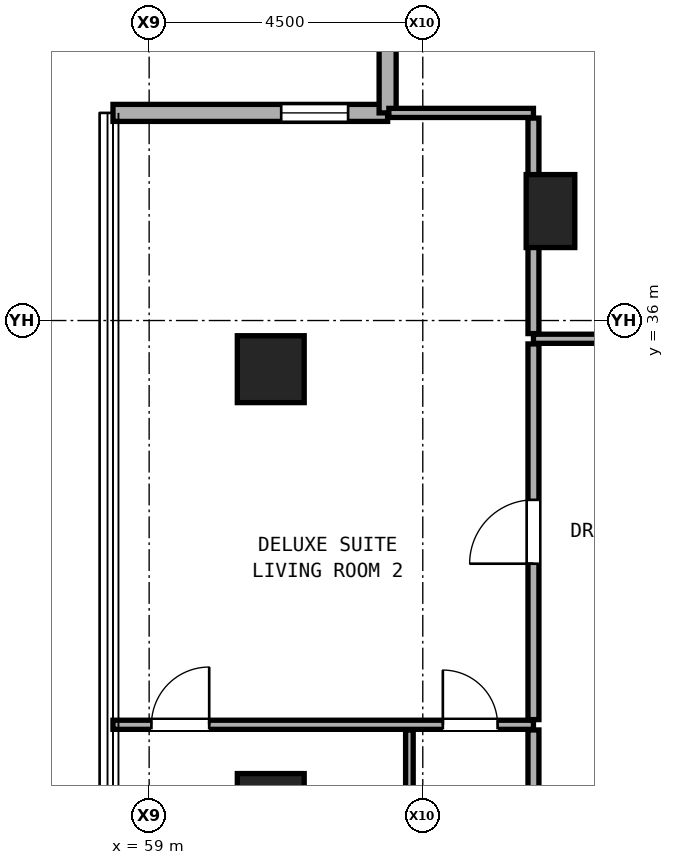
"""IFC4 building model, lengths in metres.
Left out: names, types, materials, properties, quantities, classifications, styles, units other than length and angle.
Written with IfcOpenShell. Run it as: python <this file> out.ifc"""

import sys

from ifc_helpers import new_model, si_unit, direction, frame, frame_2d, origin, origin_2d, place, context, subcontext, project, spatial, rectangle, hollow_rectangle, extrude, element, fill, save


model = new_model("IFC4")
c1 = context("Model", 3, precision=1e-05, world=origin(), true_north=direction((0.0, 1.0)))
c2 = subcontext(c1, "Body", "Model", "MODEL_VIEW")
j1 = project(units=[si_unit("LENGTHUNIT", "METRE"), si_unit("PLANEANGLEUNIT", "RADIAN")], contexts=[c1])
p1 = place(None, origin())
s1 = spatial("IfcSite", under=j1, at=p1, CompositionType="ELEMENT")
p2 = place(p1, origin())
s2 = spatial("IfcBuilding", under=s1, at=p2, CompositionType="ELEMENT")
p3 = place(p2, frame((0.0, 0.0, 101.6)))
s3 = spatial("IfcBuildingStorey", under=s2, at=p3, CompositionType="ELEMENT", Elevation=101.6)
for number, where, z_axis, x_axis in (
    (1, (61.0, 28.0, 0.0), (0.0, 0.0, 1.0), (1.0, 0.0, 0.0)),
    (2, (61.0, 35.2, 0.0), (0.0, 0.0, 1.0), (1.0, 0.0, 0.0)),
):
    element("IfcColumn", number, at=place(p3, frame(where, z_axis=z_axis, x_axis=x_axis)), inside=s3, PredefinedType="COLUMN", context=c2, shape_type="SweptSolid", body=[
        extrude(hollow_rectangle(XDim=1.1, YDim=1.1, WallThickness=0.06, at=origin_2d()), origin(), (0.0, 0.0, 1.0), 3.3),
    ])
p4 = place(p3, frame((65.6, 37.8, 0.0), z_axis=(0.0, 0.0, 1.0), x_axis=(1.0, 0.0, 0.0)))
e3 = element("IfcColumn", 3, at=p4, inside=s3, PredefinedType="PILASTER", context=c2, shape_type="SweptSolid", body=[
    extrude(rectangle(XDim=0.8, YDim=1.2, at=origin_2d()), origin(), (0.0, 0.0, 1.0), 3.3),
])
p5 = place(p3, frame((62.922, 39.414, 0.0), z_axis=(0.0, 0.0, 1.0), x_axis=(-1.0, 0.0, 0.0)))
e4 = element("IfcWall", 4, at=p5, inside=s3, PredefinedType="SOLIDWALL", context=c2, shape_type="SweptSolid", body=[
    extrude(rectangle(XDim=4.516, YDim=0.28, at=frame_2d((2.258, 0.0))), origin(), (0.0, 0.0, 1.0), 3.06),
])
p6 = place(p5, frame((0.65, 0.0, 0.85)))
e5 = element("IfcOpeningElement", 5, at=p6, cuts=e4, PredefinedType="OPENING", context=c2, shape_type="SweptSolid", body=[
    extrude(rectangle(XDim=1.1, YDim=2.0, at=frame_2d((0.55, 1.0))), frame((0.0, 0.15, 0.0), z_axis=(0.0, -1.0, 0.0), x_axis=(1.0, 0.0, 0.0)), (0.0, 0.0, 1.0), 0.3),
])
p7 = place(p3, frame((62.922, 43.931, 0.0), z_axis=(0.0, 0.0, 1.0), x_axis=(0.0, -1.0, 0.0)))
e6 = element("IfcWall", 6, at=p7, inside=s3, PredefinedType="SOLIDWALL", context=c2, shape_type="SweptSolid", body=[
    extrude(rectangle(XDim=4.516, YDim=0.28, at=frame_2d((2.258, 0.0))), origin(), (0.0, 0.0, 1.0), 3.06),
])
p8 = place(p3, frame((58.405, 29.352, 0.0), z_axis=(0.0, 0.0, 1.0), x_axis=(1.0, 0.0, 0.0)))
e7 = element("IfcWall", 7, at=p8, inside=s3, PredefinedType="PARTITIONING", context=c2, shape_type="SweptSolid", body=[
    extrude(rectangle(XDim=6.915, YDim=0.15, at=frame_2d((3.458, 0.0))), origin(), (0.0, 0.0, 1.0), 2.216),
])
p9 = place(p8, frame((0.633, 0.0, 0.0)))
e8 = element("IfcOpeningElement", 8, at=p9, cuts=e7, PredefinedType="OPENING", context=c2, shape_type="SweptSolid", body=[
    extrude(rectangle(XDim=0.95, YDim=2.15, at=frame_2d((0.475, 1.075))), frame((0.0, 0.085, 0.0), z_axis=(0.0, -1.0, 0.0), x_axis=(1.0, 0.0, 0.0)), (0.0, 0.0, 1.0), 0.17),
])
p10 = place(p8, frame((5.425, 0.0, 0.0)))
e9 = element("IfcOpeningElement", 9, at=p10, cuts=e7, PredefinedType="OPENING", context=c2, shape_type="SweptSolid", body=[
    extrude(rectangle(XDim=0.9, YDim=2.1, at=frame_2d((0.45, 1.05))), frame((0.0, 0.085, 0.0), z_axis=(0.0, -1.0, 0.0), x_axis=(1.0, 0.0, 0.0)), (0.0, 0.0, 1.0), 0.17),
])
p11 = place(p3, frame((65.32, 35.7, 0.0), z_axis=(0.0, 0.0, 1.0), x_axis=(1.0, 0.0, 0.0)))
e10 = element("IfcWall", 10, at=p11, inside=s3, PredefinedType="PARTITIONING", context=c2, shape_type="SweptSolid", body=[
    extrude(rectangle(XDim=1.36, YDim=0.15, at=frame_2d((0.68, 0.0))), origin(), (0.0, 0.0, 1.0), 3.08),
])
p12 = place(p3, frame((62.942, 39.414, 0.0), z_axis=(0.0, 0.0, 1.0), x_axis=(1.0, 0.0, 0.0)))
e11 = element("IfcWall", 11, at=p12, inside=s3, PredefinedType="PARTITIONING", context=c2, shape_type="SweptSolid", body=[
    extrude(rectangle(XDim=2.378, YDim=0.15, at=frame_2d((1.189, 0.0))), origin(), (0.0, 0.0, 1.0), 3.08),
])
p13 = place(p3, frame((63.28, 26.705, 0.0), z_axis=(0.0, 0.0, 1.0), x_axis=(0.0, 1.0, 0.0)))
e12 = element("IfcWall", 12, at=p13, inside=s3, PredefinedType="PARTITIONING", context=c2, shape_type="SweptSolid", body=[
    extrude(rectangle(XDim=2.562, YDim=0.125, at=frame_2d((1.281, 0.0))), origin(), (0.0, 0.0, 1.0), 2.299),
])
p14 = place(p3, frame((65.32, 26.705, 0.0), z_axis=(0.0, 0.0, 1.0), x_axis=(0.0, 1.0, 0.0)))
e13 = element("IfcWall", 13, at=p14, inside=s3, PredefinedType="PARTITIONING", context=c2, shape_type="SweptSolid", body=[
    extrude(rectangle(XDim=2.562, YDim=0.18, at=frame_2d((1.281, 0.0))), origin(), (0.0, 0.0, 1.0), 2.299),
])
p15 = place(p3, frame((65.32, 29.437, 0.0), z_axis=(0.0, 0.0, 1.0), x_axis=(0.0, 1.0, 0.0)))
e14 = element("IfcWall", 14, at=p15, inside=s3, PredefinedType="PARTITIONING", context=c2, shape_type="SweptSolid", body=[
    extrude(rectangle(XDim=6.178, YDim=0.18, at=frame_2d((3.089, 0.0))), origin(), (0.0, 0.0, 1.0), 2.472),
])
p16 = place(p15, frame((2.564, 0.0, 0.0)))
e15 = element("IfcOpeningElement", 15, at=p16, cuts=e14, PredefinedType="OPENING", context=c2, shape_type="SweptSolid", body=[
    extrude(rectangle(XDim=1.05, YDim=2.2, at=frame_2d((0.525, 1.1))), frame((0.0, 0.1, 0.0), z_axis=(0.0, -1.0, 0.0), x_axis=(1.0, 0.0, 0.0)), (0.0, 0.0, 1.0), 0.2),
])
p17 = place(p3, frame((65.32, 35.785, 0.0), z_axis=(0.0, 0.0, 1.0), x_axis=(0.0, 1.0, 0.0)))
e16 = element("IfcWall", 16, at=p17, inside=s3, PredefinedType="PARTITIONING", context=c2, shape_type="SweptSolid", body=[
    extrude(rectangle(XDim=3.544, YDim=0.18, at=frame_2d((1.772, 0.0))), origin(), (0.0, 0.0, 1.0), 2.456),
])
p18 = place(p6, origin())
e17 = element("IfcWindow", 17, at=p18, inside=s3, PartitioningType="SINGLE_PANEL", PredefinedType="WINDOW", context=c2, shape_type="SweptSolid", body=[
    extrude(rectangle(XDim=1.1, YDim=2.0, at=frame_2d((0.55, 1.0))), frame((0.0, 0.03, 0.0), z_axis=(0.0, -1.0, 0.0), x_axis=(1.0, 0.0, 0.0)), (0.0, 0.0, 1.0), 0.06),
])
fill(e5, e17)
p19 = place(p16, origin())
e18 = element("IfcDoor", 18, at=p19, inside=s3, OperationType="SINGLE_SWING_LEFT", PredefinedType="DOOR", context=c2, shape_type="SweptSolid", body=[
    extrude(rectangle(XDim=1.05, YDim=2.2, at=frame_2d((0.525, 1.1))), frame((0.0, 0.025, 0.0), z_axis=(0.0, -1.0, 0.0), x_axis=(1.0, 0.0, 0.0)), (0.0, 0.0, 1.0), 0.05),
])
fill(e15, e18)
p20 = place(p9, origin())
e19 = element("IfcDoor", 19, at=p20, inside=s3, OperationType="SINGLE_SWING_RIGHT", PredefinedType="DOOR", context=c2, shape_type="SweptSolid", body=[
    extrude(rectangle(XDim=0.95, YDim=2.15, at=frame_2d((0.475, 1.075))), frame((0.0, 0.025, 0.0), z_axis=(0.0, -1.0, 0.0), x_axis=(1.0, 0.0, 0.0)), (0.0, 0.0, 1.0), 0.05),
])
fill(e8, e19)
p21 = place(p10, origin())
e20 = element("IfcDoor", 20, at=p21, inside=s3, OperationType="SINGLE_SWING_LEFT", PredefinedType="DOOR", context=c2, shape_type="SweptSolid", body=[
    extrude(rectangle(XDim=0.9, YDim=2.1, at=frame_2d((0.45, 1.05))), frame((0.0, 0.025, 0.0), z_axis=(0.0, -1.0, 0.0), x_axis=(1.0, 0.0, 0.0)), (0.0, 0.0, 1.0), 0.05),
])
fill(e9, e20)
save(model, sys.argv[1])
